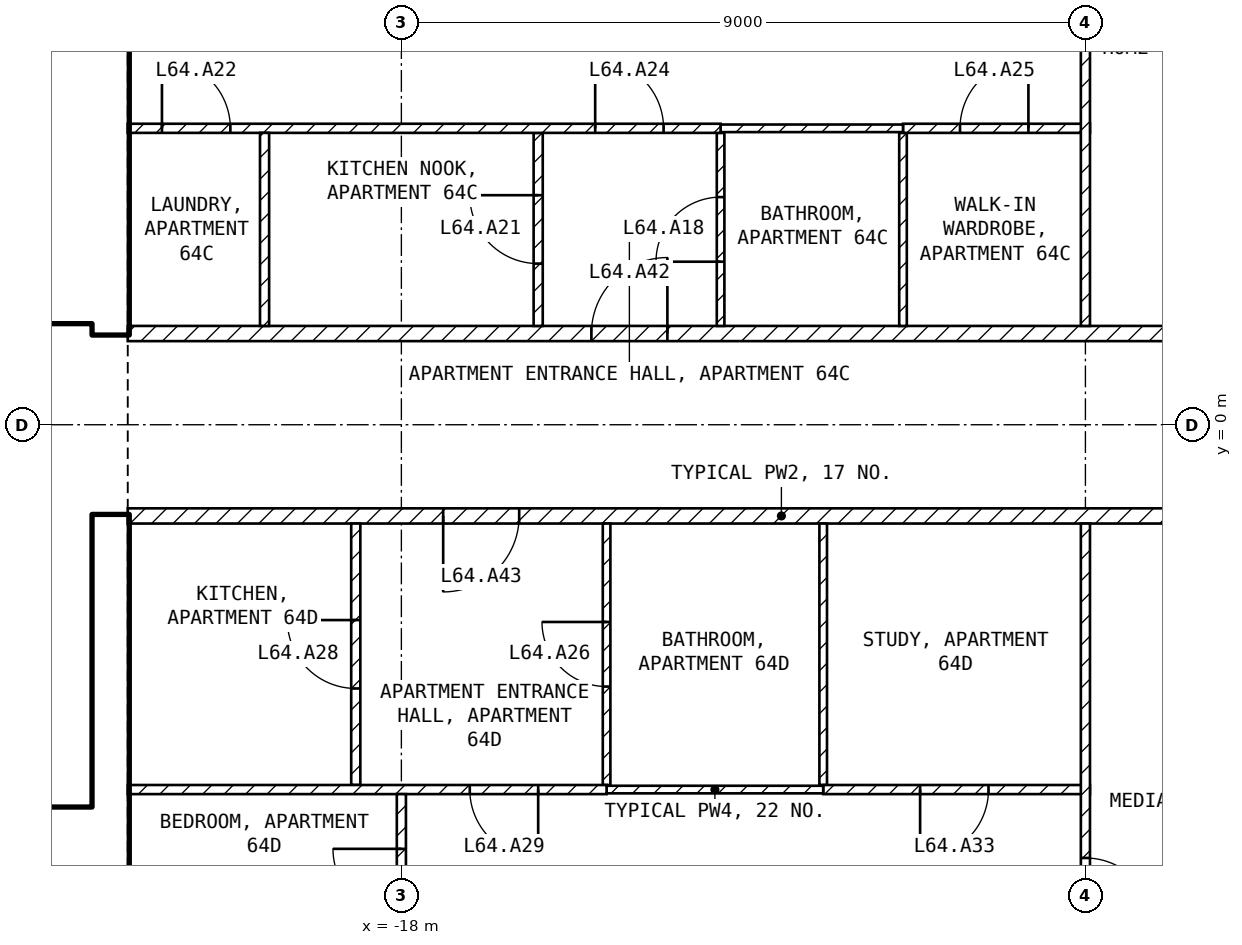
"""IFC4 building model, lengths in metres.
Left out: names, types, materials, properties, quantities, classifications, styles, units other than length and angle.
Written with IfcOpenShell. Run it as: python <this file> out.ifc"""

import sys

from ifc_helpers import new_model, si_unit, direction, frame, frame_2d, origin, place, context, subcontext, project, spatial, rectangle, extrude, element, fill, save


model = new_model("IFC4")
c1 = context("Model", 3, precision=1e-05, world=origin(), true_north=direction((0.0, 1.0)))
c2 = subcontext(c1, "Body", "Model", "MODEL_VIEW")
j1 = project(units=[si_unit("LENGTHUNIT", "METRE"), si_unit("PLANEANGLEUNIT", "RADIAN")], contexts=[c1])
p1 = place(None, origin())
s1 = spatial("IfcSite", under=j1, at=p1, CompositionType="ELEMENT")
p2 = place(p1, origin())
s2 = spatial("IfcBuilding", under=s1, at=p2, CompositionType="ELEMENT")
p3 = place(p2, frame((0.0, 0.0, 253.5)))
s3 = spatial("IfcBuildingStorey", under=s2, at=p3, CompositionType="ELEMENT", Elevation=253.5)
for number, where, z_axis, x_axis in (
    (1, (-21.825, -8.1, 0.0), (0.0, 0.0, 1.0), (0.0, 1.0, 0.0)),
    (2, (-21.825, 1.2, 0.0), (0.0, 0.0, 1.0), (0.0, 1.0, 0.0)),
):
    element("IfcWall", number, at=place(p3, frame(where, z_axis=z_axis, x_axis=x_axis)), inside=s3, PredefinedType="SHEAR", context=c2, shape_type="SweptSolid", body=[
        extrude(rectangle(XDim=6.9, YDim=0.45, at=frame_2d((3.45, 0.0))), origin(), (0.0, 0.0, 1.0), 3.25),
    ])
p4 = place(p3, frame((-33.35, 1.45, 0.0), z_axis=(0.0, 0.0, 1.0), x_axis=(1.0, 0.0, 0.0)))
e3 = element("IfcWall", 3, at=p4, inside=s3, PredefinedType="SOLIDWALL", context=c2, shape_type="SweptSolid", body=[
    extrude(rectangle(XDim=11.3, YDim=0.2, at=frame_2d((5.65, 0.0))), origin(), (0.0, 0.0, 1.0), 3.25),
])
p5 = place(p4, frame((9.55, 0.0, 0.0)))
e4 = element("IfcOpeningElement", 4, at=p5, cuts=e3, PredefinedType="OPENING", context=c2, shape_type="SweptSolid", body=[
    extrude(rectangle(XDim=1.0, YDim=2.1, at=frame_2d((0.5, 1.05))), frame((0.0, 0.11, 0.0), z_axis=(0.0, -1.0, 0.0), x_axis=(1.0, 0.0, 0.0)), (0.0, 0.0, 1.0), 0.22),
])
p6 = place(p4, frame((7.05, 0.0, 0.0)))
e5 = element("IfcOpeningElement", 5, at=p6, cuts=e3, PredefinedType="OPENING", context=c2, shape_type="SweptSolid", body=[
    extrude(rectangle(XDim=1.0, YDim=2.1, at=frame_2d((0.5, 1.05))), frame((0.0, 0.11, 0.0), z_axis=(0.0, -1.0, 0.0), x_axis=(1.0, 0.0, 0.0)), (0.0, 0.0, 1.0), 0.22),
])
p7 = place(p4, frame((1.175, 0.0, 0.0)))
e6 = element("IfcOpeningElement", 6, at=p7, cuts=e3, PredefinedType="OPENING", context=c2, shape_type="SweptSolid", body=[
    extrude(rectangle(XDim=0.9, YDim=2.1, at=frame_2d((0.45, 1.05))), frame((0.0, 0.11, 0.0), z_axis=(0.0, -1.0, 0.0), x_axis=(1.0, 0.0, 0.0)), (0.0, 0.0, 1.0), 0.22),
])
p8 = place(p3, frame((-28.35, -5.15, 0.0), z_axis=(0.0, 0.0, 1.0), x_axis=(1.0, 0.0, 0.0)))
e7 = element("IfcWall", 7, at=p8, inside=s3, PredefinedType="SOLIDWALL", context=c2, shape_type="SweptSolid", body=[
    extrude(rectangle(XDim=6.3, YDim=0.2, at=frame_2d((3.15, 0.0))), origin(), (0.0, 0.0, 1.0), 3.25),
])
p9 = place(p8, frame((5.1, 0.0, 0.0)))
e8 = element("IfcOpeningElement", 8, at=p9, cuts=e7, PredefinedType="OPENING", context=c2, shape_type="SweptSolid", body=[
    extrude(rectangle(XDim=1.0, YDim=2.1, at=frame_2d((0.5, 1.05))), frame((0.0, 0.11, 0.0), z_axis=(0.0, -1.0, 0.0), x_axis=(1.0, 0.0, 0.0)), (0.0, 0.0, 1.0), 0.22),
])
p10 = place(p3, frame((-21.6, 1.2, 0.0), z_axis=(0.0, 0.0, 1.0), x_axis=(1.0, 0.0, 0.0)))
e9 = element("IfcWall", 9, at=p10, inside=s3, PredefinedType="PARTITIONING", context=c2, shape_type="SweptSolid", body=[
    extrude(rectangle(XDim=17.2, YDim=0.2, at=frame_2d((8.6, 0.0))), origin(), (0.0, 0.0, 1.0), 3.25),
])
p11 = place(p10, frame((6.1, 0.0, 0.0)))
e10 = element("IfcOpeningElement", 10, at=p11, cuts=e9, PredefinedType="OPENING", context=c2, shape_type="SweptSolid", body=[
    extrude(rectangle(XDim=1.0, YDim=2.1, at=frame_2d((0.5, 1.05))), frame((0.0, 0.11, 0.0), z_axis=(0.0, -1.0, 0.0), x_axis=(1.0, 0.0, 0.0)), (0.0, 0.0, 1.0), 0.22),
])
p12 = place(p3, frame((-4.4, -1.2, 0.0), z_axis=(0.0, 0.0, 1.0), x_axis=(-1.0, 0.0, 0.0)))
e11 = element("IfcWall", 11, at=p12, inside=s3, PredefinedType="PARTITIONING", context=c2, shape_type="SweptSolid", body=[
    extrude(rectangle(XDim=17.2, YDim=0.2, at=frame_2d((8.6, 0.0))), origin(), (0.0, 0.0, 1.0), 3.25),
])
p13 = place(p12, frame((12.05, 0.0, 0.0)))
e12 = element("IfcOpeningElement", 12, at=p13, cuts=e11, PredefinedType="OPENING", context=c2, shape_type="SweptSolid", body=[
    extrude(rectangle(XDim=1.0, YDim=2.1, at=frame_2d((0.5, 1.05))), frame((0.0, 0.11, 0.0), z_axis=(0.0, -1.0, 0.0), x_axis=(1.0, 0.0, 0.0)), (0.0, 0.0, 1.0), 0.22),
])
p14 = place(p3, frame((-11.4, 1.3, 0.0), z_axis=(0.0, 0.0, 1.0), x_axis=(0.0, 1.0, 0.0)))
e13 = element("IfcWall", 13, at=p14, inside=s3, PredefinedType="PARTITIONING", context=c2, shape_type="SweptSolid", body=[
    extrude(rectangle(XDim=2.54, YDim=0.1, at=frame_2d((1.27, 0.0))), origin(), (0.0, 0.0, 1.0), 3.25),
])
p15 = place(p3, frame((-11.4, 3.9, 0.0), z_axis=(0.0, 0.0, 1.0), x_axis=(1.0, 0.0, 0.0)))
e14 = element("IfcWall", 14, at=p15, inside=s3, PredefinedType="PARTITIONING", context=c2, shape_type="SweptSolid", body=[
    extrude(rectangle(XDim=2.46, YDim=0.12, at=frame_2d((1.23, 0.0))), origin(), (0.0, 0.0, 1.0), 3.25),
])
p16 = place(p15, frame((0.75, 0.0, 0.0)))
e15 = element("IfcOpeningElement", 15, at=p16, cuts=e14, PredefinedType="OPENING", context=c2, shape_type="SweptSolid", body=[
    extrude(rectangle(XDim=0.9, YDim=2.1, at=frame_2d((0.45, 1.05))), frame((0.0, 0.07, 0.0), z_axis=(0.0, -1.0, 0.0), x_axis=(1.0, 0.0, 0.0)), (0.0, 0.0, 1.0), 0.14),
])
p17 = place(p3, frame((-9.0, 8.92, 0.0), z_axis=(0.0, 0.0, 1.0), x_axis=(0.0, -1.0, 0.0)))
e16 = element("IfcWall", 16, at=p17, inside=s3, PredefinedType="PARTITIONING", context=c2, shape_type="SweptSolid", body=[
    extrude(rectangle(XDim=7.62, YDim=0.12, at=frame_2d((3.81, 0.0))), origin(), (0.0, 0.0, 1.0), 3.25),
])
p18 = place(p17, frame((2.47, 0.0, 0.0)))
e17 = element("IfcOpeningElement", 17, at=p18, cuts=e16, PredefinedType="OPENING", context=c2, shape_type="SweptSolid", body=[
    extrude(rectangle(XDim=0.9, YDim=2.1, at=frame_2d((0.45, 1.05))), frame((0.0, 0.07, 0.0), z_axis=(0.0, -1.0, 0.0), x_axis=(1.0, 0.0, 0.0)), (0.0, 0.0, 1.0), 0.14),
])
p19 = place(p3, frame((-13.8, 1.3, 0.0), z_axis=(0.0, 0.0, 1.0), x_axis=(0.0, 1.0, 0.0)))
e18 = element("IfcWall", 18, at=p19, inside=s3, PredefinedType="PARTITIONING", context=c2, shape_type="SweptSolid", body=[
    extrude(rectangle(XDim=2.54, YDim=0.1, at=frame_2d((1.27, 0.0))), origin(), (0.0, 0.0, 1.0), 3.25),
])
p20 = place(p19, frame((0.845, 0.0, 0.0)))
e19 = element("IfcOpeningElement", 19, at=p20, cuts=e18, PredefinedType="OPENING", context=c2, shape_type="SweptSolid", body=[
    extrude(rectangle(XDim=0.85, YDim=2.1, at=frame_2d((0.425, 1.05))), frame((0.0, 0.06, 0.0), z_axis=(0.0, -1.0, 0.0), x_axis=(1.0, 0.0, 0.0)), (0.0, 0.0, 1.0), 0.12),
])
p21 = place(p3, frame((-13.8, 3.9, 0.0), z_axis=(0.0, 0.0, 1.0), x_axis=(1.0, 0.0, 0.0)))
e20 = element("IfcWall", 20, at=p21, inside=s3, PredefinedType="PARTITIONING", context=c2, shape_type="SweptSolid", body=[
    extrude(rectangle(XDim=2.4, YDim=0.1, at=frame_2d((1.2, 0.0))), origin(), (0.0, 0.0, 1.0), 3.25),
])
p22 = place(p3, frame((-16.2, 1.3, 0.0), z_axis=(0.0, 0.0, 1.0), x_axis=(0.0, 1.0, 0.0)))
e21 = element("IfcWall", 21, at=p22, inside=s3, PredefinedType="PARTITIONING", context=c2, shape_type="SweptSolid", body=[
    extrude(rectangle(XDim=2.54, YDim=0.12, at=frame_2d((1.27, 0.0))), origin(), (0.0, 0.0, 1.0), 3.25),
])
p23 = place(p22, frame((0.82, 0.0, 0.0)))
e22 = element("IfcOpeningElement", 22, at=p23, cuts=e21, PredefinedType="OPENING", context=c2, shape_type="SweptSolid", body=[
    extrude(rectangle(XDim=0.9, YDim=2.1, at=frame_2d((0.45, 1.05))), frame((0.0, 0.07, 0.0), z_axis=(0.0, -1.0, 0.0), x_axis=(1.0, 0.0, 0.0)), (0.0, 0.0, 1.0), 0.14),
])
p24 = place(p3, frame((-21.6, 3.9, 0.0), z_axis=(0.0, 0.0, 1.0), x_axis=(1.0, 0.0, 0.0)))
e23 = element("IfcWall", 23, at=p24, inside=s3, PredefinedType="PARTITIONING", context=c2, shape_type="SweptSolid", body=[
    extrude(rectangle(XDim=7.8, YDim=0.12, at=frame_2d((3.9, 0.0))), origin(), (0.0, 0.0, 1.0), 3.25),
])
p25 = place(p24, frame((0.45, 0.0, 0.0)))
e24 = element("IfcOpeningElement", 24, at=p25, cuts=e23, PredefinedType="OPENING", context=c2, shape_type="SweptSolid", body=[
    extrude(rectangle(XDim=0.9, YDim=2.1, at=frame_2d((0.45, 1.05))), frame((0.0, 0.07, 0.0), z_axis=(0.0, -1.0, 0.0), x_axis=(1.0, 0.0, 0.0)), (0.0, 0.0, 1.0), 0.14),
])
p26 = place(p24, frame((6.15, 0.0, 0.0)))
e25 = element("IfcOpeningElement", 25, at=p26, cuts=e23, PredefinedType="OPENING", context=c2, shape_type="SweptSolid", body=[
    extrude(rectangle(XDim=0.9, YDim=2.1, at=frame_2d((0.45, 1.05))), frame((0.0, 0.07, 0.0), z_axis=(0.0, -1.0, 0.0), x_axis=(1.0, 0.0, 0.0)), (0.0, 0.0, 1.0), 0.14),
])
p27 = place(p3, frame((-19.8, 1.3, 0.0), z_axis=(0.0, 0.0, 1.0), x_axis=(0.0, 1.0, 0.0)))
e26 = element("IfcWall", 26, at=p27, inside=s3, PredefinedType="PARTITIONING", context=c2, shape_type="SweptSolid", body=[
    extrude(rectangle(XDim=2.54, YDim=0.12, at=frame_2d((1.27, 0.0))), origin(), (0.0, 0.0, 1.0), 3.25),
])
p28 = place(p3, frame((-12.45, -4.74, 0.0), z_axis=(0.0, 0.0, 1.0), x_axis=(0.0, 1.0, 0.0)))
e27 = element("IfcWall", 27, at=p28, inside=s3, PredefinedType="PARTITIONING", context=c2, shape_type="SweptSolid", body=[
    extrude(rectangle(XDim=3.44, YDim=0.1, at=frame_2d((1.72, 0.0))), origin(), (0.0, 0.0, 1.0), 3.25),
])
p29 = place(p3, frame((-8.94, -4.8, 0.0), z_axis=(0.0, 0.0, 1.0), x_axis=(-1.0, 0.0, 0.0)))
e28 = element("IfcWall", 28, at=p29, inside=s3, PredefinedType="PARTITIONING", context=c2, shape_type="SweptSolid", body=[
    extrude(rectangle(XDim=3.51, YDim=0.12, at=frame_2d((1.755, 0.0))), origin(), (0.0, 0.0, 1.0), 3.25),
])
p30 = place(p29, frame((1.335, 0.0, 0.0)))
e29 = element("IfcOpeningElement", 29, at=p30, cuts=e28, PredefinedType="OPENING", context=c2, shape_type="SweptSolid", body=[
    extrude(rectangle(XDim=0.9, YDim=2.1, at=frame_2d((0.45, 1.05))), frame((0.0, 0.07, 0.0), z_axis=(0.0, -1.0, 0.0), x_axis=(1.0, 0.0, 0.0)), (0.0, 0.0, 1.0), 0.14),
])
p31 = place(p3, frame((-9.0, -1.3, 0.0), z_axis=(0.0, 0.0, 1.0), x_axis=(0.0, -1.0, 0.0)))
e30 = element("IfcWall", 30, at=p31, inside=s3, PredefinedType="PARTITIONING", context=c2, shape_type="SweptSolid", body=[
    extrude(rectangle(XDim=7.62, YDim=0.12, at=frame_2d((3.81, 0.0))), origin(), (0.0, 0.0, 1.0), 3.25),
])
p32 = place(p31, frame((4.4, 0.0, 0.0)))
e31 = element("IfcOpeningElement", 31, at=p32, cuts=e30, PredefinedType="OPENING", context=c2, shape_type="SweptSolid", body=[
    extrude(rectangle(XDim=0.9, YDim=2.1, at=frame_2d((0.45, 1.05))), frame((0.0, 0.07, 0.0), z_axis=(0.0, -1.0, 0.0), x_axis=(1.0, 0.0, 0.0)), (0.0, 0.0, 1.0), 0.14),
])
p33 = place(p3, frame((-15.3, -4.74, 0.0), z_axis=(0.0, 0.0, 1.0), x_axis=(0.0, 1.0, 0.0)))
e32 = element("IfcWall", 32, at=p33, inside=s3, PredefinedType="PARTITIONING", context=c2, shape_type="SweptSolid", body=[
    extrude(rectangle(XDim=3.44, YDim=0.1, at=frame_2d((1.72, 0.0))), origin(), (0.0, 0.0, 1.0), 3.25),
])
p34 = place(p33, frame((1.295, 0.0, 0.0)))
e33 = element("IfcOpeningElement", 33, at=p34, cuts=e32, PredefinedType="OPENING", context=c2, shape_type="SweptSolid", body=[
    extrude(rectangle(XDim=0.85, YDim=2.1, at=frame_2d((0.425, 1.05))), frame((0.0, 0.06, 0.0), z_axis=(0.0, -1.0, 0.0), x_axis=(1.0, 0.0, 0.0)), (0.0, 0.0, 1.0), 0.12),
])
p35 = place(p3, frame((-12.45, -4.8, 0.0), z_axis=(0.0, 0.0, 1.0), x_axis=(-1.0, 0.0, 0.0)))
e34 = element("IfcWall", 34, at=p35, inside=s3, PredefinedType="PARTITIONING", context=c2, shape_type="SweptSolid", body=[
    extrude(rectangle(XDim=2.85, YDim=0.1, at=frame_2d((1.425, 0.0))), origin(), (0.0, 0.0, 1.0), 3.25),
])
p36 = place(p3, frame((-18.6, -4.74, 0.0), z_axis=(0.0, 0.0, 1.0), x_axis=(0.0, 1.0, 0.0)))
e35 = element("IfcWall", 35, at=p36, inside=s3, PredefinedType="PARTITIONING", context=c2, shape_type="SweptSolid", body=[
    extrude(rectangle(XDim=3.44, YDim=0.12, at=frame_2d((1.72, 0.0))), origin(), (0.0, 0.0, 1.0), 3.25),
])
p37 = place(p36, frame((1.27, 0.0, 0.0)))
e36 = element("IfcOpeningElement", 36, at=p37, cuts=e35, PredefinedType="OPENING", context=c2, shape_type="SweptSolid", body=[
    extrude(rectangle(XDim=0.9, YDim=2.1, at=frame_2d((0.45, 1.05))), frame((0.0, 0.07, 0.0), z_axis=(0.0, -1.0, 0.0), x_axis=(1.0, 0.0, 0.0)), (0.0, 0.0, 1.0), 0.14),
])
p38 = place(p3, frame((-15.3, -4.8, 0.0), z_axis=(0.0, 0.0, 1.0), x_axis=(-1.0, 0.0, 0.0)))
e37 = element("IfcWall", 37, at=p38, inside=s3, PredefinedType="PARTITIONING", context=c2, shape_type="SweptSolid", body=[
    extrude(rectangle(XDim=6.3, YDim=0.12, at=frame_2d((3.15, 0.0))), origin(), (0.0, 0.0, 1.0), 3.25),
])
p39 = place(p38, frame((0.9, 0.0, 0.0)))
e38 = element("IfcOpeningElement", 38, at=p39, cuts=e37, PredefinedType="OPENING", context=c2, shape_type="SweptSolid", body=[
    extrude(rectangle(XDim=0.9, YDim=2.1, at=frame_2d((0.45, 1.05))), frame((0.0, 0.07, 0.0), z_axis=(0.0, -1.0, 0.0), x_axis=(1.0, 0.0, 0.0)), (0.0, 0.0, 1.0), 0.14),
])
p40 = place(p3, frame((-18.0, -8.92, 0.0), z_axis=(0.0, 0.0, 1.0), x_axis=(0.0, 1.0, 0.0)))
e39 = element("IfcWall", 39, at=p40, inside=s3, PredefinedType="PARTITIONING", context=c2, shape_type="SweptSolid", body=[
    extrude(rectangle(XDim=4.06, YDim=0.12, at=frame_2d((2.03, 0.0))), origin(), (0.0, 0.0, 1.0), 2.496),
])
p41 = place(p40, frame((2.44, 0.0, 0.0)))
e40 = element("IfcOpeningElement", 40, at=p41, cuts=e39, PredefinedType="OPENING", context=c2, shape_type="SweptSolid", body=[
    extrude(rectangle(XDim=0.9, YDim=2.1, at=frame_2d((0.45, 1.05))), frame((0.0, 0.07, 0.0), z_axis=(0.0, -1.0, 0.0), x_axis=(1.0, 0.0, 0.0)), (0.0, 0.0, 1.0), 0.14),
])
p42 = place(p9, origin())
e41 = element("IfcDoor", 41, at=p42, inside=s3, OperationType="SINGLE_SWING_LEFT", PredefinedType="DOOR", context=c2, shape_type="SweptSolid", body=[
    extrude(rectangle(XDim=1.0, YDim=2.1, at=frame_2d((0.5, 1.05))), frame((0.0, 0.025, 0.0), z_axis=(0.0, -1.0, 0.0), x_axis=(1.0, 0.0, 0.0)), (0.0, 0.0, 1.0), 0.05),
])
fill(e8, e41)
p43 = place(p20, origin())
e42 = element("IfcDoor", 42, at=p43, inside=s3, OperationType="SINGLE_SWING_LEFT", PredefinedType="DOOR", context=c2, shape_type="SweptSolid", body=[
    extrude(rectangle(XDim=0.85, YDim=2.1, at=frame_2d((0.425, 1.05))), frame((0.0, 0.025, 0.0), z_axis=(0.0, -1.0, 0.0), x_axis=(1.0, 0.0, 0.0)), (0.0, 0.0, 1.0), 0.05),
])
fill(e19, e42)
p44 = place(p23, origin())
e43 = element("IfcDoor", 43, at=p44, inside=s3, OperationType="SINGLE_SWING_RIGHT", PredefinedType="DOOR", context=c2, shape_type="SweptSolid", body=[
    extrude(rectangle(XDim=0.9, YDim=2.1, at=frame_2d((0.45, 1.05))), frame((0.0, 0.025, 0.0), z_axis=(0.0, -1.0, 0.0), x_axis=(1.0, 0.0, 0.0)), (0.0, 0.0, 1.0), 0.05),
])
fill(e22, e43)
p45 = place(p25, origin())
e44 = element("IfcDoor", 44, at=p45, inside=s3, OperationType="SINGLE_SWING_LEFT", PredefinedType="DOOR", context=c2, shape_type="SweptSolid", body=[
    extrude(rectangle(XDim=0.9, YDim=2.1, at=frame_2d((0.45, 1.05))), frame((0.0, 0.025, 0.0), z_axis=(0.0, -1.0, 0.0), x_axis=(1.0, 0.0, 0.0)), (0.0, 0.0, 1.0), 0.05),
])
fill(e24, e44)
p46 = place(p26, origin())
e45 = element("IfcDoor", 45, at=p46, inside=s3, OperationType="SINGLE_SWING_LEFT", PredefinedType="DOOR", context=c2, shape_type="SweptSolid", body=[
    extrude(rectangle(XDim=0.9, YDim=2.1, at=frame_2d((0.45, 1.05))), frame((0.0, 0.025, 0.0), z_axis=(0.0, -1.0, 0.0), x_axis=(1.0, 0.0, 0.0)), (0.0, 0.0, 1.0), 0.05),
])
fill(e25, e45)
p47 = place(p16, origin())
e46 = element("IfcDoor", 46, at=p47, inside=s3, OperationType="SINGLE_SWING_RIGHT", PredefinedType="DOOR", context=c2, shape_type="SweptSolid", body=[
    extrude(rectangle(XDim=0.9, YDim=2.1, at=frame_2d((0.45, 1.05))), frame((0.0, 0.025, 0.0), z_axis=(0.0, -1.0, 0.0), x_axis=(1.0, 0.0, 0.0)), (0.0, 0.0, 1.0), 0.05),
])
fill(e15, e46)
p48 = place(p34, origin())
e47 = element("IfcDoor", 47, at=p48, inside=s3, OperationType="SINGLE_SWING_RIGHT", PredefinedType="DOOR", context=c2, shape_type="SweptSolid", body=[
    extrude(rectangle(XDim=0.85, YDim=2.1, at=frame_2d((0.425, 1.05))), frame((0.0, 0.025, 0.0), z_axis=(0.0, -1.0, 0.0), x_axis=(1.0, 0.0, 0.0)), (0.0, 0.0, 1.0), 0.05),
])
fill(e33, e47)
p49 = place(p41, origin())
e48 = element("IfcDoor", 48, at=p49, inside=s3, OperationType="SINGLE_SWING_RIGHT", PredefinedType="DOOR", context=c2, shape_type="SweptSolid", body=[
    extrude(rectangle(XDim=0.9, YDim=2.1, at=frame_2d((0.45, 1.05))), frame((0.0, 0.025, 0.0), z_axis=(0.0, -1.0, 0.0), x_axis=(1.0, 0.0, 0.0)), (0.0, 0.0, 1.0), 0.05),
])
fill(e40, e48)
p50 = place(p37, origin())
e49 = element("IfcDoor", 49, at=p50, inside=s3, OperationType="SINGLE_SWING_RIGHT", PredefinedType="DOOR", context=c2, shape_type="SweptSolid", body=[
    extrude(rectangle(XDim=0.9, YDim=2.1, at=frame_2d((0.45, 1.05))), frame((0.0, 0.025, 0.0), z_axis=(0.0, -1.0, 0.0), x_axis=(1.0, 0.0, 0.0)), (0.0, 0.0, 1.0), 0.05),
])
fill(e36, e49)
p51 = place(p39, origin())
e50 = element("IfcDoor", 50, at=p51, inside=s3, OperationType="SINGLE_SWING_LEFT", PredefinedType="DOOR", context=c2, shape_type="SweptSolid", body=[
    extrude(rectangle(XDim=0.9, YDim=2.1, at=frame_2d((0.45, 1.05))), frame((0.0, 0.025, 0.0), z_axis=(0.0, -1.0, 0.0), x_axis=(1.0, 0.0, 0.0)), (0.0, 0.0, 1.0), 0.05),
])
fill(e38, e50)
p52 = place(p32, origin())
e51 = element("IfcDoor", 51, at=p52, inside=s3, OperationType="SINGLE_SWING_RIGHT", PredefinedType="DOOR", context=c2, shape_type="SweptSolid", body=[
    extrude(rectangle(XDim=0.9, YDim=2.1, at=frame_2d((0.45, 1.05))), frame((0.0, 0.025, 0.0), z_axis=(0.0, -1.0, 0.0), x_axis=(1.0, 0.0, 0.0)), (0.0, 0.0, 1.0), 0.05),
])
fill(e31, e51)
p53 = place(p30, origin())
e52 = element("IfcDoor", 52, at=p53, inside=s3, OperationType="SINGLE_SWING_RIGHT", PredefinedType="DOOR", context=c2, shape_type="SweptSolid", body=[
    extrude(rectangle(XDim=0.9, YDim=2.1, at=frame_2d((0.45, 1.05))), frame((0.0, 0.025, 0.0), z_axis=(0.0, -1.0, 0.0), x_axis=(1.0, 0.0, 0.0)), (0.0, 0.0, 1.0), 0.05),
])
fill(e29, e52)
p54 = place(p11, origin())
e53 = element("IfcDoor", 53, at=p54, inside=s3, OperationType="SINGLE_SWING_RIGHT", PredefinedType="DOOR", context=c2, shape_type="SweptSolid", body=[
    extrude(rectangle(XDim=1.0, YDim=2.1, at=frame_2d((0.5, 1.05))), frame((0.0, 0.025, 0.0), z_axis=(0.0, -1.0, 0.0), x_axis=(1.0, 0.0, 0.0)), (0.0, 0.0, 1.0), 0.05),
])
fill(e10, e53)
p55 = place(p13, origin())
e54 = element("IfcDoor", 54, at=p55, inside=s3, OperationType="SINGLE_SWING_RIGHT", PredefinedType="DOOR", context=c2, shape_type="SweptSolid", body=[
    extrude(rectangle(XDim=1.0, YDim=2.1, at=frame_2d((0.5, 1.05))), frame((0.0, 0.025, 0.0), z_axis=(0.0, -1.0, 0.0), x_axis=(1.0, 0.0, 0.0)), (0.0, 0.0, 1.0), 0.05),
])
fill(e12, e54)
save(model, sys.argv[1])
